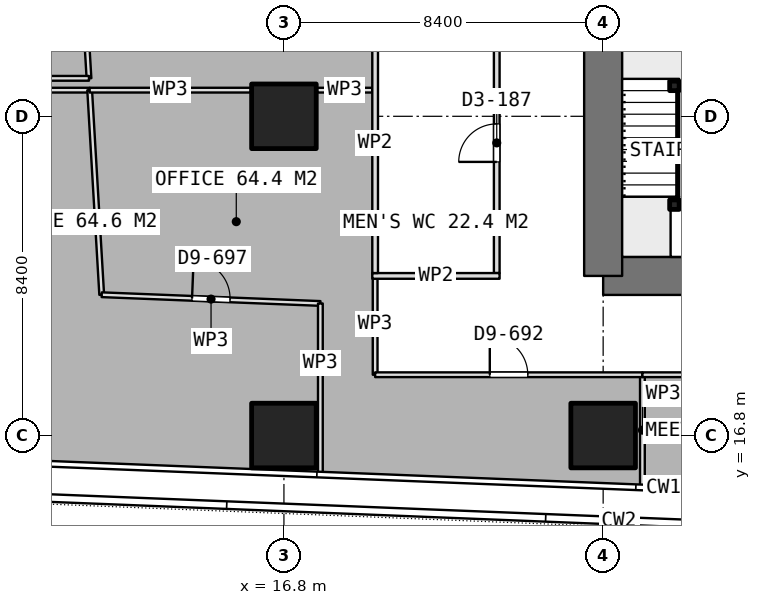
"""IFC4 building model, lengths in metres.
Left out: names, types, materials, properties, quantities, classifications, styles, units other than length and angle.
Written with IfcOpenShell. Run it as: python <this file> out.ifc"""

import sys

from ifc_helpers import new_model, si_unit, direction, frame, frame_2d, origin, origin_2d, place, context, subcontext, project, spatial, rectangle, extrude, element, fill, save


model = new_model("IFC4")
c1 = context("Model", 3, precision=1e-05, world=origin(), true_north=direction((0.0, 1.0)))
c2 = subcontext(c1, "Body", "Model", "MODEL_VIEW")
j1 = project(units=[si_unit("LENGTHUNIT", "METRE"), si_unit("PLANEANGLEUNIT", "RADIAN")], contexts=[c1])
p1 = place(None, origin())
s1 = spatial("IfcSite", under=j1, at=p1, CompositionType="ELEMENT")
p2 = place(p1, origin())
s2 = spatial("IfcBuilding", under=s1, at=p2, CompositionType="ELEMENT")
p3 = place(p2, frame((0.0, 0.0, 180.2)))
s3 = spatial("IfcBuildingStorey", under=s2, at=p3, CompositionType="ELEMENT", Elevation=180.2)
p4 = place(p3, frame((25.2, 21.0, 0.0), z_axis=(0.0, 0.0, 1.0), x_axis=(1.0, 0.0, 0.0)))
e1 = element("IfcWall", 1, at=p4, inside=s3, PredefinedType="SHEAR", context=c2, shape_type="SweptSolid", body=[
    extrude(rectangle(XDim=10.4, YDim=1.0, at=frame_2d((5.2, 0.0))), origin(), (0.0, 0.0, 1.0), 3.75),
])
p5 = place(p3, frame((25.2, 21.0, 0.0), z_axis=(0.0, 0.0, 1.0), x_axis=(0.0, 1.0, 0.0)))
e2 = element("IfcWall", 2, at=p5, inside=s3, PredefinedType="SHEAR", context=c2, shape_type="SweptSolid", body=[
    extrude(rectangle(XDim=25.2, YDim=1.0, at=frame_2d((12.6, 0.0))), origin(), (0.0, 0.0, 1.0), 3.75),
])
p6 = place(p5, frame((7.8, 0.0, 0.0)))
e3 = element("IfcOpeningElement", 3, at=p6, cuts=e2, PredefinedType="OPENING", context=c2, shape_type="SweptSolid", body=[
    extrude(rectangle(XDim=1.2, YDim=2.1, at=frame_2d((0.6, 1.05))), frame((0.0, 0.51, 0.0), z_axis=(0.0, -1.0, 0.0), x_axis=(1.0, 0.0, 0.0)), (0.0, 0.0, 1.0), 1.02),
])
p7 = place(p5, frame((14.25, 0.0, 0.0)))
e4 = element("IfcOpeningElement", 4, at=p7, cuts=e2, PredefinedType="OPENING", context=c2, shape_type="SweptSolid", body=[
    extrude(rectangle(XDim=0.9, YDim=2.1, at=frame_2d((0.45, 1.05))), frame((0.0, 0.51, 0.0), z_axis=(0.0, -1.0, 0.0), x_axis=(1.0, 0.0, 0.0)), (0.0, 0.0, 1.0), 1.02),
])
p8 = place(p5, frame((16.85, 0.0, 0.0)))
e5 = element("IfcOpeningElement", 5, at=p8, cuts=e2, PredefinedType="OPENING", context=c2, shape_type="SweptSolid", body=[
    extrude(rectangle(XDim=0.9, YDim=2.1, at=frame_2d((0.45, 1.05))), frame((0.0, 0.51, 0.0), z_axis=(0.0, -1.0, 0.0), x_axis=(1.0, 0.0, 0.0)), (0.0, 0.0, 1.0), 1.02),
])
p9 = place(p5, frame((19.025, 0.0, 0.0)))
e6 = element("IfcOpeningElement", 6, at=p9, cuts=e2, PredefinedType="OPENING", context=c2, shape_type="SweptSolid", body=[
    extrude(rectangle(XDim=1.2, YDim=2.1, at=frame_2d((0.6, 1.05))), frame((0.0, 0.51, 0.0), z_axis=(0.0, -1.0, 0.0), x_axis=(1.0, 0.0, 0.0)), (0.0, 0.0, 1.0), 1.02),
])
for number, where, z_axis, x_axis in (
    (7, (16.8, 16.8, 0.0), (0.0, 0.0, 1.0), (1.0, 0.0, 0.0)),
    (8, (16.8, 25.2, 0.0), (0.0, 0.0, 1.0), (1.0, 0.0, 0.0)),
    (9, (25.2, 16.8, 0.0), (0.0, 0.0, 1.0), (1.0, 0.0, 0.0)),
):
    element("IfcColumn", number, at=place(p3, frame(where, z_axis=z_axis, x_axis=x_axis)), inside=s3, PredefinedType="COLUMN", context=c2, shape_type="SweptSolid", body=[
        extrude(rectangle(XDim=1.7, YDim=1.7, at=origin_2d()), origin(), (0.0, 0.0, 1.0), 3.75),
    ])
p10 = place(p3, frame((19.125, 21.0, 0.0), z_axis=(0.0, 0.0, 1.0), x_axis=(1.0, 0.0, 0.0)))
e10 = element("IfcWall", 10, at=p10, inside=s3, PredefinedType="PARTITIONING", context=c2, shape_type="SweptSolid", body=[
    extrude(rectangle(XDim=3.35, YDim=0.15, at=frame_2d((1.675, 0.0))), origin(), (0.0, 0.0, 1.0), 3.5),
])
p11 = place(p3, frame((19.2, 21.075, 0.0), z_axis=(0.0, 0.0, 1.0), x_axis=(0.0, 1.0, 0.0)))
e11 = element("IfcWall", 11, at=p11, inside=s3, PredefinedType="PARTITIONING", context=c2, shape_type="SweptSolid", body=[
    extrude(rectangle(XDim=6.85, YDim=0.15, at=frame_2d((3.425, 0.0))), origin(), (0.0, 0.0, 1.0), 3.5),
])
p12 = place(p3, frame((22.4, 21.075, 0.0), z_axis=(0.0, 0.0, 1.0), x_axis=(0.0, 1.0, 0.0)))
e12 = element("IfcWall", 12, at=p12, inside=s3, PredefinedType="PARTITIONING", context=c2, shape_type="SweptSolid", body=[
    extrude(rectangle(XDim=6.85, YDim=0.15, at=frame_2d((3.425, 0.0))), origin(), (0.0, 0.0, 1.0), 3.5),
])
p13 = place(p12, frame((2.925, 0.0, 0.0)))
e13 = element("IfcOpeningElement", 13, at=p13, cuts=e12, PredefinedType="OPENING", context=c2, shape_type="SweptSolid", body=[
    extrude(rectangle(XDim=1.0, YDim=2.1, at=frame_2d((0.5, 1.05))), frame((0.0, 0.085, 0.0), z_axis=(0.0, -1.0, 0.0), x_axis=(1.0, 0.0, 0.0)), (0.0, 0.0, 1.0), 0.17),
])
p14 = place(p3, frame((9.27, 25.888, 0.0), z_axis=(0.0, 0.0, 1.0), x_axis=(1.0, 0.0, 0.0)))
e14 = element("IfcWall", 14, at=p14, inside=s3, PredefinedType="PARTITIONING", context=c2, shape_type="SweptSolid", body=[
    extrude(rectangle(XDim=2.418, YDim=0.125, at=frame_2d((1.209, 0.0))), origin(), (0.0, 0.0, 1.0), 3.5),
])
p15 = place(p3, frame((11.688, 25.888, 0.0), z_axis=(0.0, 0.0, 1.0), x_axis=(0.058767140917, -0.998271718095, 0.0)))
e15 = element("IfcWall", 15, at=p15, inside=s3, PredefinedType="PARTITIONING", context=c2, shape_type="SweptSolid", body=[
    extrude(rectangle(XDim=5.392, YDim=0.125, at=frame_2d((2.696, 0.0))), origin(), (0.0, 0.0, 1.0), 3.5),
])
p16 = place(p3, frame((12.005, 20.505, 0.0), z_axis=(0.0, 0.0, 1.0), x_axis=(0.999202244946, -0.039935869776, 0.0)))
e16 = element("IfcWall", 16, at=p16, inside=s3, PredefinedType="PARTITIONING", context=c2, shape_type="SweptSolid", body=[
    extrude(rectangle(XDim=5.759, YDim=0.125, at=frame_2d((2.879, 0.0))), origin(), (0.0, 0.0, 1.0), 3.5),
])
p17 = place(p16, frame((2.379, 0.0, 0.0)))
e17 = element("IfcOpeningElement", 17, at=p17, cuts=e16, PredefinedType="OPENING", context=c2, shape_type="SweptSolid", body=[
    extrude(rectangle(XDim=1.0, YDim=2.1, at=frame_2d((0.5, 1.05))), frame((0.0, 0.073, 0.0), z_axis=(0.0, -1.0, 0.0), x_axis=(1.0, 0.0, 0.0)), (0.0, 0.0, 1.0), 0.145),
])
p18 = place(p3, frame((17.759, 20.275, 0.0), z_axis=(0.0, 0.0, 1.0), x_axis=(0.0, -1.0, 0.0)))
e18 = element("IfcWall", 18, at=p18, inside=s3, PredefinedType="PARTITIONING", context=c2, shape_type="SweptSolid", body=[
    extrude(rectangle(XDim=4.453, YDim=0.125, at=frame_2d((2.227, 0.0))), origin(), (0.0, 0.0, 1.0), 3.5),
])
p19 = place(p3, frame((26.233, 18.4, 0.0), z_axis=(0.0, 0.0, 1.0), x_axis=(0.0, -1.0, 0.0)))
e19 = element("IfcWall", 19, at=p19, inside=s3, PredefinedType="PARTITIONING", context=c2, shape_type="SweptSolid", body=[
    extrude(rectangle(XDim=2.917, YDim=0.125, at=frame_2d((1.458, 0.0))), origin(), (0.0, 0.0, 1.0), 3.5),
])
p20 = place(p3, frame((11.688, 25.888, 0.0), z_axis=(0.0, 0.0, 1.0), x_axis=(1.0, 0.0, 0.0)))
e20 = element("IfcWall", 20, at=p20, inside=s3, PredefinedType="PARTITIONING", context=c2, shape_type="SweptSolid", body=[
    extrude(rectangle(XDim=4.242, YDim=0.125, at=frame_2d((2.121, 0.0))), origin(), (0.0, 0.0, 1.0), 3.5),
])
p21 = place(p3, frame((17.67, 25.888, 0.0), z_axis=(0.0, 0.0, 1.0), x_axis=(1.0, 0.0, 0.0)))
e21 = element("IfcWall", 21, at=p21, inside=s3, PredefinedType="PARTITIONING", context=c2, shape_type="SweptSolid", body=[
    extrude(rectangle(XDim=1.455, YDim=0.125, at=frame_2d((0.728, 0.0))), origin(), (0.0, 0.0, 1.0), 3.5),
])
p22 = place(p3, frame((19.2, 21.075, 0.0), z_axis=(0.0, 0.0, 1.0), x_axis=(0.0, -1.0, 0.0)))
e22 = element("IfcWall", 22, at=p22, inside=s3, PredefinedType="PARTITIONING", context=c2, shape_type="SweptSolid", body=[
    extrude(rectangle(XDim=2.675, YDim=0.125, at=frame_2d((1.337, 0.0))), origin(), (0.0, 0.0, 1.0), 3.5),
])
p23 = place(p3, frame((19.2, 18.4, 0.0), z_axis=(0.0, 0.0, 1.0), x_axis=(1.0, 0.0, 0.0)))
e23 = element("IfcWall", 23, at=p23, inside=s3, PredefinedType="PARTITIONING", context=c2, shape_type="SweptSolid", body=[
    extrude(rectangle(XDim=7.033, YDim=0.125, at=frame_2d((3.517, 0.0))), origin(), (0.0, 0.0, 1.0), 3.5),
])
p24 = place(p23, frame((3.017, 0.0, 0.0)))
e24 = element("IfcOpeningElement", 24, at=p24, cuts=e23, PredefinedType="OPENING", context=c2, shape_type="SweptSolid", body=[
    extrude(rectangle(XDim=1.0, YDim=2.1, at=frame_2d((0.5, 1.05))), frame((0.0, 0.073, 0.0), z_axis=(0.0, -1.0, 0.0), x_axis=(1.0, 0.0, 0.0)), (0.0, 0.0, 1.0), 0.145),
])
p25 = place(p3, frame((26.233, 18.4, 0.0), z_axis=(0.0, 0.0, 1.0), x_axis=(1.0, 0.0, 0.0)))
e25 = element("IfcWall", 25, at=p25, inside=s3, PredefinedType="PARTITIONING", context=c2, shape_type="SweptSolid", body=[
    extrude(rectangle(XDim=8.472, YDim=0.125, at=frame_2d((4.236, 0.0))), origin(), (0.0, 0.0, 1.0), 3.5),
])
p26 = place(p25, frame((3.736, 0.0, 0.0)))
e26 = element("IfcOpeningElement", 26, at=p26, cuts=e25, PredefinedType="OPENING", context=c2, shape_type="SweptSolid", body=[
    extrude(rectangle(XDim=1.0, YDim=2.1, at=frame_2d((0.5, 1.05))), frame((0.0, 0.073, 0.0), z_axis=(0.0, -1.0, 0.0), x_axis=(1.0, 0.0, 0.0)), (0.0, 0.0, 1.0), 0.145),
])
p27 = place(p3, frame((11.168, 34.71, 0.0), z_axis=(0.0, 0.0, 1.0), x_axis=(0.058874777336, -0.998265375836, 0.0)))
e27 = element("IfcWall", 27, at=p27, inside=s3, PredefinedType="PARTITIONING", context=c2, shape_type="SweptSolid", body=[
    extrude(rectangle(XDim=8.526, YDim=0.125, at=frame_2d((4.263, 0.0))), origin(), (0.0, 0.0, 1.0), 3.5),
])
p28 = place(p27, frame((3.763, 0.0, 0.0)))
e28 = element("IfcOpeningElement", 28, at=p28, cuts=e27, PredefinedType="OPENING", context=c2, shape_type="SweptSolid", body=[
    extrude(rectangle(XDim=1.0, YDim=2.1, at=frame_2d((0.5, 1.05))), frame((0.0, 0.073, 0.0), z_axis=(0.0, -1.0, 0.0), x_axis=(1.0, 0.0, 0.0)), (0.0, 0.0, 1.0), 0.145),
])
p29 = place(p3, frame((11.67, 26.199, 0.0), z_axis=(0.0, 0.0, 1.0), x_axis=(-1.0, 0.0, 0.0)))
e29 = element("IfcWall", 29, at=p29, inside=s3, PredefinedType="PARTITIONING", context=c2, shape_type="SweptSolid", body=[
    extrude(rectangle(XDim=4.458, YDim=0.125, at=frame_2d((2.229, 0.0))), origin(), (0.0, 0.0, 1.0), 3.5),
])
for number, where, z_axis, x_axis in (
    (30, (27.075, 22.875, 0.0), (0.0, 0.0, 1.0), (1.0, 0.0, 0.0)),
    (31, (27.075, 26.0, 0.0), (0.0, 0.0, 1.0), (1.0, 0.0, 0.0)),
):
    element("IfcColumn", number, at=place(p3, frame(where, z_axis=z_axis, x_axis=x_axis)), inside=s3, PredefinedType="COLUMN", context=c2, shape_type="SweptSolid", body=[
        extrude(rectangle(XDim=0.25, YDim=0.25, at=origin_2d()), origin(), (0.0, 0.0, 1.0), 3.75),
    ])
p30 = place(p13, origin())
e32 = element("IfcDoor", 32, at=p30, inside=s3, OperationType="SINGLE_SWING_LEFT", PredefinedType="DOOR", context=c2, shape_type="SweptSolid", body=[
    extrude(rectangle(XDim=1.0, YDim=2.1, at=frame_2d((0.5, 1.05))), frame((0.0, 0.025, 0.0), z_axis=(0.0, -1.0, 0.0), x_axis=(1.0, 0.0, 0.0)), (0.0, 0.0, 1.0), 0.05),
])
fill(e13, e32)
p31 = place(p24, origin())
e33 = element("IfcDoor", 33, at=p31, inside=s3, OperationType="SINGLE_SWING_LEFT", PredefinedType="DOOR", context=c2, shape_type="SweptSolid", body=[
    extrude(rectangle(XDim=1.0, YDim=2.1, at=frame_2d((0.5, 1.05))), frame((0.0, 0.025, 0.0), z_axis=(0.0, -1.0, 0.0), x_axis=(1.0, 0.0, 0.0)), (0.0, 0.0, 1.0), 0.05),
])
fill(e24, e33)
p32 = place(p17, origin())
e34 = element("IfcDoor", 34, at=p32, inside=s3, OperationType="SINGLE_SWING_LEFT", PredefinedType="DOOR", context=c2, shape_type="SweptSolid", body=[
    extrude(rectangle(XDim=1.0, YDim=2.1, at=frame_2d((0.5, 1.05))), frame((0.0, 0.025, 0.0), z_axis=(0.0, -1.0, 0.0), x_axis=(1.0, 0.0, 0.0)), (0.0, 0.0, 1.0), 0.05),
])
fill(e17, e34)
save(model, sys.argv[1])
